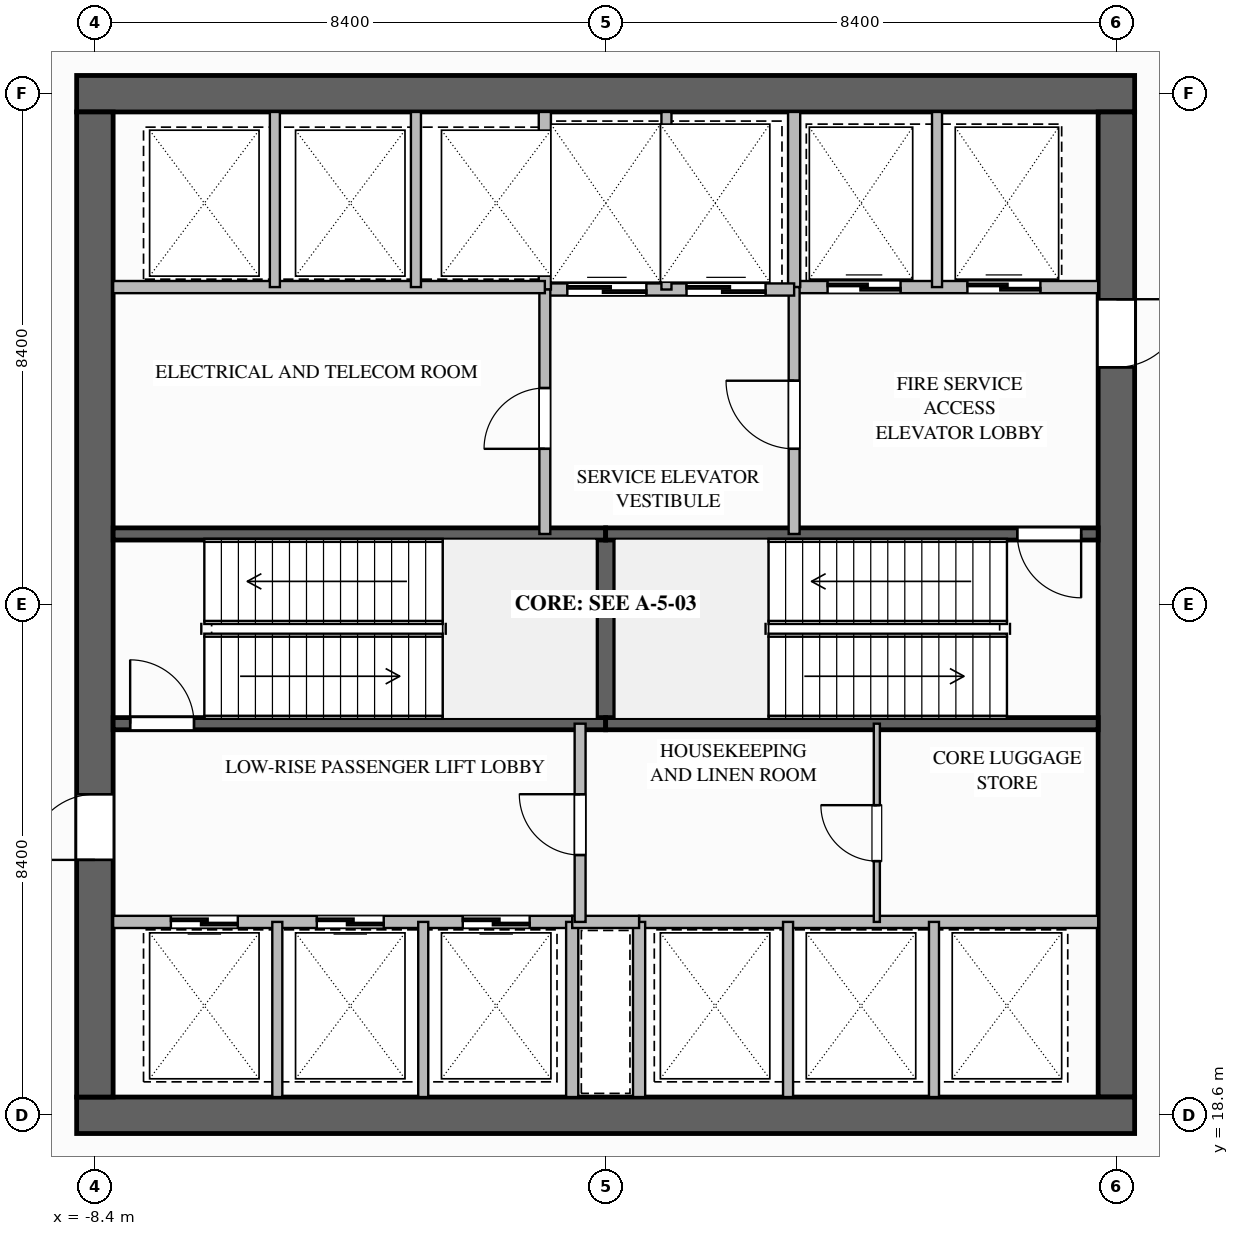
"""IFC4 building model, lengths in metres.
Left out: names, types, materials, properties, quantities, classifications, styles, units other than length and angle.
Written with IfcOpenShell. Run it as: python <this file> out.ifc"""

import sys

from ifc_helpers import new_model, si_unit, direction, frame, frame_2d, origin, place, context, subcontext, project, spatial, rectangle, extrude, element, fill, save


model = new_model("IFC4")
c1 = context("Model", 3, precision=1e-05, world=origin(), true_north=direction((0.0, 1.0)))
c2 = subcontext(c1, "Body", "Model", "MODEL_VIEW")
j1 = project(units=[si_unit("LENGTHUNIT", "METRE"), si_unit("PLANEANGLEUNIT", "RADIAN")], contexts=[c1])
p1 = place(None, origin())
s1 = spatial("IfcSite", under=j1, at=p1, CompositionType="ELEMENT")
p2 = place(p1, origin())
s2 = spatial("IfcBuilding", under=s1, at=p2, CompositionType="ELEMENT")
p3 = place(p2, frame((0.0, 0.0, 5.6)))
s3 = spatial("IfcBuildingStorey", under=s2, at=p3, CompositionType="ELEMENT", Elevation=5.6)
p4 = place(p3, frame((-8.7, 35.4, 0.0), z_axis=(0.0, 0.0, 1.0), x_axis=(1.0, 0.0, 0.0)))
e1 = element("IfcWall", 1, at=p4, inside=s3, PredefinedType="SHEAR", context=c2, shape_type="SweptSolid", body=[
    extrude(rectangle(XDim=17.4, YDim=0.6, at=frame_2d((8.7, 0.0))), origin(), (0.0, 0.0, 1.0), 5.2),
])
p5 = place(p3, frame((8.4, 35.1, 0.0), z_axis=(0.0, 0.0, 1.0), x_axis=(0.0, -1.0, 0.0)))
e2 = element("IfcWall", 2, at=p5, inside=s3, PredefinedType="SHEAR", context=c2, shape_type="SweptSolid", body=[
    extrude(rectangle(XDim=16.2, YDim=0.6, at=frame_2d((8.1, 0.0))), origin(), (0.0, 0.0, 1.0), 5.2),
])
p6 = place(p5, frame((3.08, 0.0, 0.0)))
e3 = element("IfcOpeningElement", 3, at=p6, cuts=e2, PredefinedType="OPENING", context=c2, shape_type="SweptSolid", body=[
    extrude(rectangle(XDim=1.12, YDim=2.1, at=frame_2d((0.56, 1.05))), frame((0.0, 0.31, 0.0), z_axis=(0.0, -1.0, 0.0), x_axis=(1.0, 0.0, 0.0)), (0.0, 0.0, 1.0), 0.62),
])
p7 = place(p3, frame((8.7, 18.6, 0.0), z_axis=(0.0, 0.0, 1.0), x_axis=(-1.0, 0.0, 0.0)))
e4 = element("IfcWall", 4, at=p7, inside=s3, PredefinedType="SHEAR", context=c2, shape_type="SweptSolid", body=[
    extrude(rectangle(XDim=17.4, YDim=0.6, at=frame_2d((8.7, 0.0))), origin(), (0.0, 0.0, 1.0), 5.2),
])
p8 = place(p3, frame((-8.4, 18.9, 0.0), z_axis=(0.0, 0.0, 1.0), x_axis=(0.0, 1.0, 0.0)))
e5 = element("IfcWall", 5, at=p8, inside=s3, PredefinedType="SHEAR", context=c2, shape_type="SweptSolid", body=[
    extrude(rectangle(XDim=16.2, YDim=0.6, at=frame_2d((8.1, 0.0))), origin(), (0.0, 0.0, 1.0), 5.2),
])
p9 = place(p8, frame((3.9, 0.0, 0.0)))
e6 = element("IfcOpeningElement", 6, at=p9, cuts=e5, PredefinedType="OPENING", context=c2, shape_type="SweptSolid", body=[
    extrude(rectangle(XDim=1.08, YDim=2.04, at=frame_2d((0.54, 1.02))), frame((0.0, 0.31, 0.0), z_axis=(0.0, -1.0, 0.0), x_axis=(1.0, 0.0, 0.0)), (0.0, 0.0, 1.0), 0.62),
])
p10 = place(p3, frame((0.0, 25.04, 0.0), z_axis=(0.0, 0.0, 1.0), x_axis=(0.0, 1.0, 0.0)))
e7 = element("IfcWall", 7, at=p10, inside=s3, PredefinedType="SOLIDWALL", context=c2, shape_type="SweptSolid", body=[
    extrude(rectangle(XDim=3.12, YDim=0.3, at=frame_2d((1.56, 0.0))), origin(), (0.0, 0.0, 1.0), 4.85),
])
p11 = place(p3, frame((-8.1, 25.04, 0.0), z_axis=(0.0, 0.0, 1.0), x_axis=(1.0, 0.0, 0.0)))
e8 = element("IfcWall", 8, at=p11, inside=s3, PredefinedType="SOLIDWALL", context=c2, shape_type="SweptSolid", body=[
    extrude(rectangle(XDim=8.1, YDim=0.2, at=frame_2d((4.05, 0.0))), origin(), (0.0, 0.0, 1.0), 4.85),
])
p12 = place(p11, frame((0.28, 0.0, 0.0)))
e9 = element("IfcOpeningElement", 9, at=p12, cuts=e8, PredefinedType="OPENING", context=c2, shape_type="SweptSolid", body=[
    extrude(rectangle(XDim=1.05, YDim=2.1, at=frame_2d((0.525, 1.05))), frame((0.0, 0.11, 0.0), z_axis=(0.0, -1.0, 0.0), x_axis=(1.0, 0.0, 0.0)), (0.0, 0.0, 1.0), 0.22),
])
for number, where, z_axis, x_axis in (
    (10, (-8.1, 28.16, 0.0), (0.0, 0.0, 1.0), (1.0, 0.0, 0.0)),
    (11, (0.0, 25.04, 0.0), (0.0, 0.0, 1.0), (1.0, 0.0, 0.0)),
):
    element("IfcWall", number, at=place(p3, frame(where, z_axis=z_axis, x_axis=x_axis)), inside=s3, PredefinedType="SOLIDWALL", context=c2, shape_type="SweptSolid", body=[
        extrude(rectangle(XDim=8.1, YDim=0.2, at=frame_2d((4.05, 0.0))), origin(), (0.0, 0.0, 1.0), 4.85),
    ])
p13 = place(p3, frame((8.1, 28.16, 0.0), z_axis=(0.0, 0.0, 1.0), x_axis=(-1.0, 0.0, 0.0)))
e12 = element("IfcWall", 12, at=p13, inside=s3, PredefinedType="SOLIDWALL", context=c2, shape_type="SweptSolid", body=[
    extrude(rectangle(XDim=8.1, YDim=0.2, at=frame_2d((4.05, 0.0))), origin(), (0.0, 0.0, 1.0), 4.85),
])
p14 = place(p13, frame((0.28, 0.0, 0.0)))
e13 = element("IfcOpeningElement", 13, at=p14, cuts=e12, PredefinedType="OPENING", context=c2, shape_type="SweptSolid", body=[
    extrude(rectangle(XDim=1.05, YDim=2.1, at=frame_2d((0.525, 1.05))), frame((0.0, 0.11, 0.0), z_axis=(0.0, -1.0, 0.0), x_axis=(1.0, 0.0, 0.0)), (0.0, 0.0, 1.0), 0.22),
])
p15 = place(p3, frame((3.1, 32.22, 0.0), z_axis=(0.0, 0.0, 1.0), x_axis=(1.0, 0.0, 0.0)))
e14 = element("IfcWall", 14, at=p15, inside=s3, PredefinedType="SOLIDWALL", context=c2, shape_type="SweptSolid", body=[
    extrude(rectangle(XDim=5.0, YDim=0.2, at=frame_2d((2.5, 0.0))), origin(), (0.0, 0.0, 1.0), 4.85),
])
p16 = place(p15, frame((0.55, 0.0, 0.0)))
e15 = element("IfcOpeningElement", 15, at=p16, cuts=e14, PredefinedType="OPENING", context=c2, shape_type="SweptSolid", body=[
    extrude(rectangle(XDim=1.2, YDim=2.2, at=frame_2d((0.6, 1.1))), frame((0.0, 0.11, 0.0), z_axis=(0.0, -1.0, 0.0), x_axis=(1.0, 0.0, 0.0)), (0.0, 0.0, 1.0), 0.22),
])
p17 = place(p15, frame((2.85, 0.0, 0.0)))
e16 = element("IfcOpeningElement", 16, at=p17, cuts=e14, PredefinedType="OPENING", context=c2, shape_type="SweptSolid", body=[
    extrude(rectangle(XDim=1.2, YDim=2.2, at=frame_2d((0.6, 1.1))), frame((0.0, 0.11, 0.0), z_axis=(0.0, -1.0, 0.0), x_axis=(1.0, 0.0, 0.0)), (0.0, 0.0, 1.0), 0.22),
])
p18 = place(p3, frame((3.1, 32.22, 0.0), z_axis=(0.0, 0.0, 1.0), x_axis=(0.0, 1.0, 0.0)))
e17 = element("IfcWall", 17, at=p18, inside=s3, PredefinedType="SOLIDWALL", context=c2, shape_type="SweptSolid", body=[
    extrude(rectangle(XDim=2.88, YDim=0.2, at=frame_2d((1.44, 0.0))), origin(), (0.0, 0.0, 1.0), 4.85),
])
p19 = place(p3, frame((5.45, 32.22, 0.0), z_axis=(0.0, 0.0, 1.0), x_axis=(0.0, 1.0, 0.0)))
e18 = element("IfcWall", 18, at=p19, inside=s3, PredefinedType="PARTITIONING", context=c2, shape_type="SweptSolid", body=[
    extrude(rectangle(XDim=2.88, YDim=0.165, at=frame_2d((1.44, 0.0))), origin(), (0.0, 0.0, 1.0), 4.85),
])
p20 = place(p3, frame((3.1, 28.16, 0.0), z_axis=(0.0, 0.0, 1.0), x_axis=(0.0, 1.0, 0.0)))
e19 = element("IfcWall", 19, at=p20, inside=s3, PredefinedType="SOLIDWALL", context=c2, shape_type="SweptSolid", body=[
    extrude(rectangle(XDim=4.06, YDim=0.18, at=frame_2d((2.03, 0.0))), origin(), (0.0, 0.0, 1.0), 4.85),
])
p21 = place(p20, frame((1.4, 0.0, 0.0)))
e20 = element("IfcOpeningElement", 20, at=p21, cuts=e19, PredefinedType="OPENING", context=c2, shape_type="SweptSolid", body=[
    extrude(rectangle(XDim=1.12, YDim=2.1, at=frame_2d((0.56, 1.05))), frame((0.0, 0.1, 0.0), z_axis=(0.0, -1.0, 0.0), x_axis=(1.0, 0.0, 0.0)), (0.0, 0.0, 1.0), 0.2),
])
p22 = place(p3, frame((-1.0, 32.18, 0.0), z_axis=(0.0, 0.0, 1.0), x_axis=(1.0, 0.0, 0.0)))
e21 = element("IfcWall", 21, at=p22, inside=s3, PredefinedType="SOLIDWALL", context=c2, shape_type="SweptSolid", body=[
    extrude(rectangle(XDim=4.1, YDim=0.2, at=frame_2d((2.05, 0.0))), origin(), (0.0, 0.0, 1.0), 4.85),
])
p23 = place(p22, frame((0.37, 0.0, 0.0)))
e22 = element("IfcOpeningElement", 22, at=p23, cuts=e21, PredefinedType="OPENING", context=c2, shape_type="SweptSolid", body=[
    extrude(rectangle(XDim=1.3, YDim=2.2, at=frame_2d((0.65, 1.1))), frame((0.0, 0.11, 0.0), z_axis=(0.0, -1.0, 0.0), x_axis=(1.0, 0.0, 0.0)), (0.0, 0.0, 1.0), 0.22),
])
p24 = place(p22, frame((2.33, 0.0, 0.0)))
e23 = element("IfcOpeningElement", 23, at=p24, cuts=e21, PredefinedType="OPENING", context=c2, shape_type="SweptSolid", body=[
    extrude(rectangle(XDim=1.3, YDim=2.2, at=frame_2d((0.65, 1.1))), frame((0.0, 0.11, 0.0), z_axis=(0.0, -1.0, 0.0), x_axis=(1.0, 0.0, 0.0)), (0.0, 0.0, 1.0), 0.22),
])
p25 = place(p3, frame((-1.0, 32.18, 0.0), z_axis=(0.0, 0.0, 1.0), x_axis=(0.0, 1.0, 0.0)))
e24 = element("IfcWall", 24, at=p25, inside=s3, PredefinedType="SOLIDWALL", context=c2, shape_type="SweptSolid", body=[
    extrude(rectangle(XDim=2.92, YDim=0.2, at=frame_2d((1.46, 0.0))), origin(), (0.0, 0.0, 1.0), 4.85),
])
p26 = place(p3, frame((1.0, 32.18, 0.0), z_axis=(0.0, 0.0, 1.0), x_axis=(0.0, 1.0, 0.0)))
e25 = element("IfcWall", 25, at=p26, inside=s3, PredefinedType="PARTITIONING", context=c2, shape_type="SweptSolid", body=[
    extrude(rectangle(XDim=2.92, YDim=0.165, at=frame_2d((1.46, 0.0))), origin(), (0.0, 0.0, 1.0), 4.85),
])
p27 = place(p3, frame((-1.0, 28.16, 0.0), z_axis=(0.0, 0.0, 1.0), x_axis=(0.0, 1.0, 0.0)))
e26 = element("IfcWall", 26, at=p27, inside=s3, PredefinedType="SOLIDWALL", context=c2, shape_type="SweptSolid", body=[
    extrude(rectangle(XDim=4.02, YDim=0.18, at=frame_2d((2.01, 0.0))), origin(), (0.0, 0.0, 1.0), 4.85),
])
p28 = place(p27, frame((1.4, 0.0, 0.0)))
e27 = element("IfcOpeningElement", 27, at=p28, cuts=e26, PredefinedType="OPENING", context=c2, shape_type="SweptSolid", body=[
    extrude(rectangle(XDim=1.0, YDim=2.1, at=frame_2d((0.5, 1.05))), frame((0.0, 0.1, 0.0), z_axis=(0.0, -1.0, 0.0), x_axis=(1.0, 0.0, 0.0)), (0.0, 0.0, 1.0), 0.2),
])
p29 = place(p3, frame((-8.1, 32.22, 0.0), z_axis=(0.0, 0.0, 1.0), x_axis=(1.0, 0.0, 0.0)))
e28 = element("IfcWall", 28, at=p29, inside=s3, PredefinedType="SOLIDWALL", context=c2, shape_type="SweptSolid", body=[
    extrude(rectangle(XDim=7.1, YDim=0.2, at=frame_2d((3.55, 0.0))), origin(), (0.0, 0.0, 1.0), 4.85),
])
for number, where, z_axis, x_axis in (
    (29, (-5.44, 32.22, 0.0), (0.0, 0.0, 1.0), (0.0, 1.0, 0.0)),
    (30, (-3.12, 32.22, 0.0), (0.0, 0.0, 1.0), (0.0, 1.0, 0.0)),
):
    element("IfcWall", number, at=place(p3, frame(where, z_axis=z_axis, x_axis=x_axis)), inside=s3, PredefinedType="PARTITIONING", context=c2, shape_type="SweptSolid", body=[
        extrude(rectangle(XDim=2.88, YDim=0.165, at=frame_2d((1.44, 0.0))), origin(), (0.0, 0.0, 1.0), 4.85),
    ])
p30 = place(p3, frame((-0.55, 21.78, 0.0), z_axis=(0.0, 0.0, 1.0), x_axis=(-1.0, 0.0, 0.0)))
e31 = element("IfcWall", 31, at=p30, inside=s3, PredefinedType="SOLIDWALL", context=c2, shape_type="SweptSolid", body=[
    extrude(rectangle(XDim=7.55, YDim=0.2, at=frame_2d((3.775, 0.0))), origin(), (0.0, 0.0, 1.0), 4.85),
])
p31 = place(p30, frame((5.5, 0.0, 0.0)))
e32 = element("IfcOpeningElement", 32, at=p31, cuts=e31, PredefinedType="OPENING", context=c2, shape_type="SweptSolid", body=[
    extrude(rectangle(XDim=1.1, YDim=2.2, at=frame_2d((0.55, 1.1))), frame((0.0, 0.11, 0.0), z_axis=(0.0, -1.0, 0.0), x_axis=(1.0, 0.0, 0.0)), (0.0, 0.0, 1.0), 0.22),
])
p32 = place(p30, frame((3.1, 0.0, 0.0)))
e33 = element("IfcOpeningElement", 33, at=p32, cuts=e31, PredefinedType="OPENING", context=c2, shape_type="SweptSolid", body=[
    extrude(rectangle(XDim=1.1, YDim=2.2, at=frame_2d((0.55, 1.1))), frame((0.0, 0.11, 0.0), z_axis=(0.0, -1.0, 0.0), x_axis=(1.0, 0.0, 0.0)), (0.0, 0.0, 1.0), 0.22),
])
p33 = place(p30, frame((0.7, 0.0, 0.0)))
e34 = element("IfcOpeningElement", 34, at=p33, cuts=e31, PredefinedType="OPENING", context=c2, shape_type="SweptSolid", body=[
    extrude(rectangle(XDim=1.1, YDim=2.2, at=frame_2d((0.55, 1.1))), frame((0.0, 0.11, 0.0), z_axis=(0.0, -1.0, 0.0), x_axis=(1.0, 0.0, 0.0)), (0.0, 0.0, 1.0), 0.22),
])
for number, where, z_axis, x_axis in (
    (35, (-5.4, 18.9, 0.0), (0.0, 0.0, 1.0), (0.0, 1.0, 0.0)),
    (36, (-3.0, 18.9, 0.0), (0.0, 0.0, 1.0), (0.0, 1.0, 0.0)),
):
    element("IfcWall", number, at=place(p3, frame(where, z_axis=z_axis, x_axis=x_axis)), inside=s3, PredefinedType="PARTITIONING", context=c2, shape_type="SweptSolid", body=[
        extrude(rectangle(XDim=2.88, YDim=0.165, at=frame_2d((1.44, 0.0))), origin(), (0.0, 0.0, 1.0), 4.85),
    ])
p34 = place(p3, frame((-0.55, 18.9, 0.0), z_axis=(0.0, 0.0, 1.0), x_axis=(0.0, 1.0, 0.0)))
e37 = element("IfcWall", 37, at=p34, inside=s3, PredefinedType="SOLIDWALL", context=c2, shape_type="SweptSolid", body=[
    extrude(rectangle(XDim=2.88, YDim=0.2, at=frame_2d((1.44, 0.0))), origin(), (0.0, 0.0, 1.0), 4.85),
])
p35 = place(p3, frame((8.1, 21.78, 0.0), z_axis=(0.0, 0.0, 1.0), x_axis=(-1.0, 0.0, 0.0)))
e38 = element("IfcWall", 38, at=p35, inside=s3, PredefinedType="SOLIDWALL", context=c2, shape_type="SweptSolid", body=[
    extrude(rectangle(XDim=7.55, YDim=0.2, at=frame_2d((3.775, 0.0))), origin(), (0.0, 0.0, 1.0), 4.85),
])
p36 = place(p3, frame((0.55, 18.9, 0.0), z_axis=(0.0, 0.0, 1.0), x_axis=(0.0, 1.0, 0.0)))
e39 = element("IfcWall", 39, at=p36, inside=s3, PredefinedType="SOLIDWALL", context=c2, shape_type="SweptSolid", body=[
    extrude(rectangle(XDim=2.88, YDim=0.2, at=frame_2d((1.44, 0.0))), origin(), (0.0, 0.0, 1.0), 4.85),
])
for number, where, z_axis, x_axis in (
    (40, (3.0, 18.9, 0.0), (0.0, 0.0, 1.0), (0.0, 1.0, 0.0)),
    (41, (5.4, 18.9, 0.0), (0.0, 0.0, 1.0), (0.0, 1.0, 0.0)),
):
    element("IfcWall", number, at=place(p3, frame(where, z_axis=z_axis, x_axis=x_axis)), inside=s3, PredefinedType="PARTITIONING", context=c2, shape_type="SweptSolid", body=[
        extrude(rectangle(XDim=2.88, YDim=0.165, at=frame_2d((1.44, 0.0))), origin(), (0.0, 0.0, 1.0), 4.85),
    ])
p37 = place(p3, frame((-0.55, 21.78, 0.0), z_axis=(0.0, 0.0, 1.0), x_axis=(1.0, 0.0, 0.0)))
e42 = element("IfcWall", 42, at=p37, inside=s3, PredefinedType="SOLIDWALL", context=c2, shape_type="SweptSolid", body=[
    extrude(rectangle(XDim=1.1, YDim=0.2, at=frame_2d((0.55, 0.0))), origin(), (0.0, 0.0, 1.0), 4.85),
])
p38 = place(p3, frame((-0.42, 21.78, 0.0), z_axis=(0.0, 0.0, 1.0), x_axis=(0.0, 1.0, 0.0)))
e43 = element("IfcWall", 43, at=p38, inside=s3, PredefinedType="SOLIDWALL", context=c2, shape_type="SweptSolid", body=[
    extrude(rectangle(XDim=3.26, YDim=0.18, at=frame_2d((1.63, 0.0))), origin(), (0.0, 0.0, 1.0), 4.85),
])
p39 = place(p38, frame((1.1, 0.0, 0.0)))
e44 = element("IfcOpeningElement", 44, at=p39, cuts=e43, PredefinedType="OPENING", context=c2, shape_type="SweptSolid", body=[
    extrude(rectangle(XDim=1.0, YDim=2.1, at=frame_2d((0.5, 1.05))), frame((0.0, 0.1, 0.0), z_axis=(0.0, -1.0, 0.0), x_axis=(1.0, 0.0, 0.0)), (0.0, 0.0, 1.0), 0.2),
])
p40 = place(p3, frame((4.46, 21.78, 0.0), z_axis=(0.0, 0.0, 1.0), x_axis=(0.0, 1.0, 0.0)))
e45 = element("IfcWall", 45, at=p40, inside=s3, PredefinedType="PARTITIONING", context=c2, shape_type="SweptSolid", body=[
    extrude(rectangle(XDim=3.26, YDim=0.1, at=frame_2d((1.63, 0.0))), origin(), (0.0, 0.0, 1.0), 4.85),
])
p41 = place(p40, frame((1.0, 0.0, 0.0)))
e46 = element("IfcOpeningElement", 46, at=p41, cuts=e45, PredefinedType="OPENING", context=c2, shape_type="SweptSolid", body=[
    extrude(rectangle(XDim=0.92, YDim=2.1, at=frame_2d((0.46, 1.05))), frame((0.0, 0.06, 0.0), z_axis=(0.0, -1.0, 0.0), x_axis=(1.0, 0.0, 0.0)), (0.0, 0.0, 1.0), 0.12),
])
p42 = place(p12, origin())
e47 = element("IfcDoor", 47, at=p42, inside=s3, OperationType="SINGLE_SWING_LEFT", PredefinedType="DOOR", context=c2, shape_type="SweptSolid", body=[
    extrude(rectangle(XDim=1.05, YDim=2.1, at=frame_2d((0.525, 1.05))), frame((0.0, 0.025, 0.0), z_axis=(0.0, -1.0, 0.0), x_axis=(1.0, 0.0, 0.0)), (0.0, 0.0, 1.0), 0.05),
])
fill(e9, e47)
p43 = place(p14, origin())
e48 = element("IfcDoor", 48, at=p43, inside=s3, OperationType="SINGLE_SWING_LEFT", PredefinedType="DOOR", context=c2, shape_type="SweptSolid", body=[
    extrude(rectangle(XDim=1.05, YDim=2.1, at=frame_2d((0.525, 1.05))), frame((0.0, 0.025, 0.0), z_axis=(0.0, -1.0, 0.0), x_axis=(1.0, 0.0, 0.0)), (0.0, 0.0, 1.0), 0.05),
])
fill(e13, e48)
p44 = place(p16, origin())
e49 = element("IfcDoor", 49, at=p44, inside=s3, OperationType="SLIDING_TO_LEFT", PredefinedType="DOOR", context=c2, shape_type="SweptSolid", body=[
    extrude(rectangle(XDim=1.2, YDim=2.2, at=frame_2d((0.6, 1.1))), frame((0.0, 0.025, 0.0), z_axis=(0.0, -1.0, 0.0), x_axis=(1.0, 0.0, 0.0)), (0.0, 0.0, 1.0), 0.05),
])
fill(e15, e49)
p45 = place(p17, origin())
e50 = element("IfcDoor", 50, at=p45, inside=s3, OperationType="SLIDING_TO_LEFT", PredefinedType="DOOR", context=c2, shape_type="SweptSolid", body=[
    extrude(rectangle(XDim=1.2, YDim=2.2, at=frame_2d((0.6, 1.1))), frame((0.0, 0.025, 0.0), z_axis=(0.0, -1.0, 0.0), x_axis=(1.0, 0.0, 0.0)), (0.0, 0.0, 1.0), 0.05),
])
fill(e16, e50)
p46 = place(p21, origin())
e51 = element("IfcDoor", 51, at=p46, inside=s3, OperationType="SINGLE_SWING_RIGHT", PredefinedType="DOOR", context=c2, shape_type="SweptSolid", body=[
    extrude(rectangle(XDim=1.12, YDim=2.1, at=frame_2d((0.56, 1.05))), frame((0.0, 0.025, 0.0), z_axis=(0.0, -1.0, 0.0), x_axis=(1.0, 0.0, 0.0)), (0.0, 0.0, 1.0), 0.05),
])
fill(e20, e51)
p47 = place(p6, origin())
e52 = element("IfcDoor", 52, at=p47, inside=s3, OperationType="SINGLE_SWING_LEFT", PredefinedType="DOOR", context=c2, shape_type="SweptSolid", body=[
    extrude(rectangle(XDim=1.12, YDim=2.1, at=frame_2d((0.56, 1.05))), frame((0.0, 0.025, 0.0), z_axis=(0.0, -1.0, 0.0), x_axis=(1.0, 0.0, 0.0)), (0.0, 0.0, 1.0), 0.05),
])
fill(e3, e52)
p48 = place(p23, origin())
e53 = element("IfcDoor", 53, at=p48, inside=s3, OperationType="SLIDING_TO_LEFT", PredefinedType="DOOR", context=c2, shape_type="SweptSolid", body=[
    extrude(rectangle(XDim=1.3, YDim=2.2, at=frame_2d((0.65, 1.1))), frame((0.0, 0.025, 0.0), z_axis=(0.0, -1.0, 0.0), x_axis=(1.0, 0.0, 0.0)), (0.0, 0.0, 1.0), 0.05),
])
fill(e22, e53)
p49 = place(p24, origin())
e54 = element("IfcDoor", 54, at=p49, inside=s3, OperationType="SLIDING_TO_LEFT", PredefinedType="DOOR", context=c2, shape_type="SweptSolid", body=[
    extrude(rectangle(XDim=1.3, YDim=2.2, at=frame_2d((0.65, 1.1))), frame((0.0, 0.025, 0.0), z_axis=(0.0, -1.0, 0.0), x_axis=(1.0, 0.0, 0.0)), (0.0, 0.0, 1.0), 0.05),
])
fill(e23, e54)
p50 = place(p28, origin())
e55 = element("IfcDoor", 55, at=p50, inside=s3, OperationType="SINGLE_SWING_LEFT", PredefinedType="DOOR", context=c2, shape_type="SweptSolid", body=[
    extrude(rectangle(XDim=1.0, YDim=2.1, at=frame_2d((0.5, 1.05))), frame((0.0, 0.025, 0.0), z_axis=(0.0, -1.0, 0.0), x_axis=(1.0, 0.0, 0.0)), (0.0, 0.0, 1.0), 0.05),
])
fill(e27, e55)
p51 = place(p31, origin())
e56 = element("IfcDoor", 56, at=p51, inside=s3, OperationType="SLIDING_TO_LEFT", PredefinedType="DOOR", context=c2, shape_type="SweptSolid", body=[
    extrude(rectangle(XDim=1.1, YDim=2.2, at=frame_2d((0.55, 1.1))), frame((0.0, 0.025, 0.0), z_axis=(0.0, -1.0, 0.0), x_axis=(1.0, 0.0, 0.0)), (0.0, 0.0, 1.0), 0.05),
])
fill(e32, e56)
p52 = place(p32, origin())
e57 = element("IfcDoor", 57, at=p52, inside=s3, OperationType="SLIDING_TO_LEFT", PredefinedType="DOOR", context=c2, shape_type="SweptSolid", body=[
    extrude(rectangle(XDim=1.1, YDim=2.2, at=frame_2d((0.55, 1.1))), frame((0.0, 0.025, 0.0), z_axis=(0.0, -1.0, 0.0), x_axis=(1.0, 0.0, 0.0)), (0.0, 0.0, 1.0), 0.05),
])
fill(e33, e57)
p53 = place(p33, origin())
e58 = element("IfcDoor", 58, at=p53, inside=s3, OperationType="SLIDING_TO_LEFT", PredefinedType="DOOR", context=c2, shape_type="SweptSolid", body=[
    extrude(rectangle(XDim=1.1, YDim=2.2, at=frame_2d((0.55, 1.1))), frame((0.0, 0.025, 0.0), z_axis=(0.0, -1.0, 0.0), x_axis=(1.0, 0.0, 0.0)), (0.0, 0.0, 1.0), 0.05),
])
fill(e34, e58)
p54 = place(p39, origin())
e59 = element("IfcDoor", 59, at=p54, inside=s3, OperationType="SINGLE_SWING_RIGHT", PredefinedType="DOOR", context=c2, shape_type="SweptSolid", body=[
    extrude(rectangle(XDim=1.0, YDim=2.1, at=frame_2d((0.5, 1.05))), frame((0.0, 0.025, 0.0), z_axis=(0.0, -1.0, 0.0), x_axis=(1.0, 0.0, 0.0)), (0.0, 0.0, 1.0), 0.05),
])
fill(e44, e59)
p55 = place(p9, origin())
e60 = element("IfcDoor", 60, at=p55, inside=s3, OperationType="SINGLE_SWING_LEFT", PredefinedType="DOOR", context=c2, shape_type="SweptSolid", body=[
    extrude(rectangle(XDim=1.08, YDim=2.04, at=frame_2d((0.54, 1.02))), frame((0.0, 0.025, 0.0), z_axis=(0.0, -1.0, 0.0), x_axis=(1.0, 0.0, 0.0)), (0.0, 0.0, 1.0), 0.05),
])
fill(e6, e60)
p56 = place(p41, origin())
e61 = element("IfcDoor", 61, at=p56, inside=s3, OperationType="SINGLE_SWING_RIGHT", PredefinedType="DOOR", context=c2, shape_type="SweptSolid", body=[
    extrude(rectangle(XDim=0.92, YDim=2.1, at=frame_2d((0.46, 1.05))), frame((0.0, 0.025, 0.0), z_axis=(0.0, -1.0, 0.0), x_axis=(1.0, 0.0, 0.0)), (0.0, 0.0, 1.0), 0.05),
])
fill(e46, e61)
save(model, sys.argv[1])
